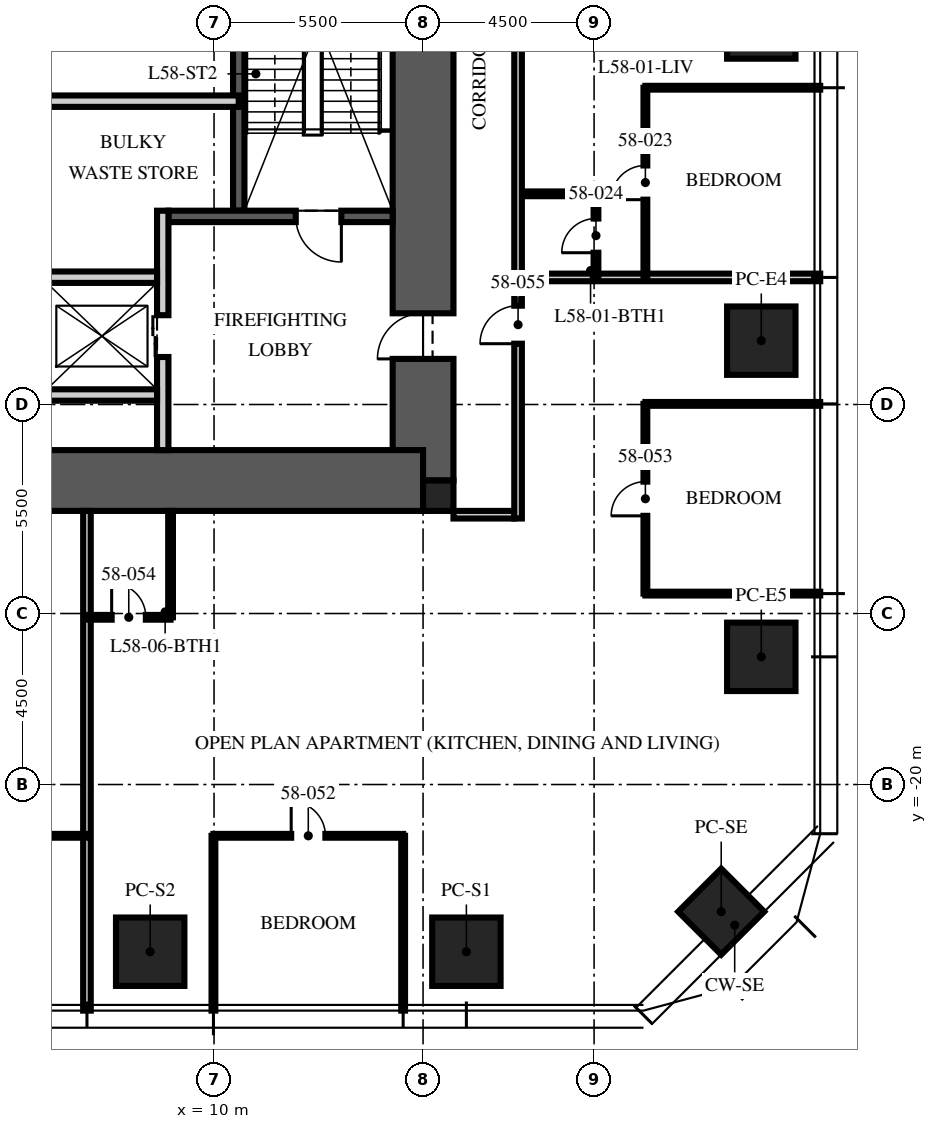
"""IFC4 building model, lengths in metres.
Left out: names, types, materials, properties, quantities, classifications, styles, units other than length and angle.
Written with IfcOpenShell. Run it as: python <this file> out.ifc"""

import sys

from ifc_helpers import new_model, si_unit, direction, frame, frame_2d, origin, origin_2d, place, context, subcontext, project, spatial, rectangle, extrude, element, fill, save


model = new_model("IFC4")
c1 = context("Model", 3, precision=1e-05, world=origin(), true_north=direction((0.0, 1.0)))
c2 = subcontext(c1, "Body", "Model", "MODEL_VIEW")
j1 = project(units=[si_unit("LENGTHUNIT", "METRE"), si_unit("PLANEANGLEUNIT", "RADIAN")], contexts=[c1])
p1 = place(None, origin())
s1 = spatial("IfcSite", under=j1, at=p1, CompositionType="ELEMENT")
p2 = place(p1, origin())
s2 = spatial("IfcBuilding", under=s1, at=p2, CompositionType="ELEMENT")
p3 = place(p2, frame((0.0, 0.0, 233.25)))
s3 = spatial("IfcBuildingStorey", under=s2, at=p3, CompositionType="ELEMENT", Elevation=233.25)
p4 = place(p3, frame((15.5, -12.0, -0.25), z_axis=(0.0, 0.0, 1.0), x_axis=(0.0, 1.0, 0.0)))
e1 = element("IfcWall", 1, at=p4, inside=s3, PredefinedType="SHEAR", context=c2, shape_type="SweptSolid", body=[
    extrude(rectangle(XDim=24.0, YDim=1.6, at=frame_2d((12.0, 0.0))), origin(), (0.0, 0.0, 1.0), 3.75),
])
p5 = place(p4, frame((3.2, 0.0, 0.25)))
e2 = element("IfcOpeningElement", 2, at=p5, cuts=e1, PredefinedType="OPENING", context=c2, shape_type="SweptSolid", body=[
    extrude(rectangle(XDim=1.2, YDim=2.1, at=frame_2d((0.6, 1.05))), frame((0.0, 0.81, 0.0), z_axis=(0.0, -1.0, 0.0), x_axis=(1.0, 0.0, 0.0)), (0.0, 0.0, 1.0), 1.62),
])
p6 = place(p4, frame((19.3, 0.0, 0.25)))
e3 = element("IfcOpeningElement", 3, at=p6, cuts=e1, PredefinedType="OPENING", context=c2, shape_type="SweptSolid", body=[
    extrude(rectangle(XDim=1.8, YDim=2.1, at=frame_2d((0.9, 1.05))), frame((0.0, 0.81, 0.0), z_axis=(0.0, -1.0, 0.0), x_axis=(1.0, 0.0, 0.0)), (0.0, 0.0, 1.0), 1.62),
])
p7 = place(p3, frame((-15.5, -12.0, -0.25), z_axis=(0.0, 0.0, 1.0), x_axis=(1.0, 0.0, 0.0)))
e4 = element("IfcWall", 4, at=p7, inside=s3, PredefinedType="SHEAR", context=c2, shape_type="SweptSolid", body=[
    extrude(rectangle(XDim=31.0, YDim=1.6, at=frame_2d((15.5, 0.0))), origin(), (0.0, 0.0, 1.0), 3.75),
])
p8 = place(p3, frame((15.9, -12.4, -0.25), z_axis=(0.0, 0.0, 1.0), x_axis=(1.0, 0.0, 0.0)))
e5 = element("IfcColumn", 5, at=p8, inside=s3, PredefinedType="COLUMN", context=c2, shape_type="SweptSolid", body=[
    extrude(rectangle(XDim=0.8, YDim=0.8, at=origin_2d()), origin(), (0.0, 0.0, 1.0), 3.75),
])
for number, where, z_axis, x_axis in (
    (6, (24.4, 0.0, 0.0), (0.0, 0.0, 1.0), (0.0, 1.0, 0.0)),
    (7, (24.4, -8.32, 0.0), (0.0, 0.0, 1.0), (0.0, 1.0, 0.0)),
    (8, (24.4, -16.64, 0.0), (0.0, 0.0, 1.0), (0.0, 1.0, 0.0)),
    (9, (16.64, -24.4, 0.0), (0.0, 0.0, 1.0), (1.0, 0.0, 0.0)),
    (10, (8.32, -24.4, 0.0), (0.0, 0.0, 1.0), (1.0, 0.0, 0.0)),
):
    element("IfcColumn", number, at=place(p3, frame(where, z_axis=z_axis, x_axis=x_axis)), inside=s3, PredefinedType="COLUMN", context=c2, shape_type="SweptSolid", body=[
        extrude(rectangle(XDim=1.8, YDim=1.8, at=origin_2d()), origin(), (0.0, 0.0, 1.0), 3.75),
    ])
p9 = place(p3, frame((23.346, -23.346, 0.0), z_axis=(0.0, 0.0, 1.0), x_axis=(0.707106781187, 0.707106781187, 0.0)))
e11 = element("IfcColumn", 11, at=p9, inside=s3, PredefinedType="COLUMN", context=c2, shape_type="SweptSolid", body=[
    extrude(rectangle(XDim=1.6, YDim=1.6, at=origin_2d()), origin(), (0.0, 0.0, 1.0), 3.75),
])
p10 = place(p3, frame((10.65, -4.9, 0.0), z_axis=(0.0, 0.0, 1.0), x_axis=(0.0, 1.0, 0.0)))
e12 = element("IfcWall", 12, at=p10, inside=s3, PredefinedType="SOLIDWALL", context=c2, shape_type="SweptSolid", body=[
    extrude(rectangle(XDim=10.1, YDim=0.3, at=frame_2d((5.05, 0.0))), origin(), (0.0, 0.0, 1.0), 3.5),
])
p11 = place(p3, frame((14.7, -5.05, 0.0), z_axis=(0.0, 0.0, 1.0), x_axis=(-1.0, 0.0, 0.0)))
e13 = element("IfcWall", 13, at=p11, inside=s3, PredefinedType="SOLIDWALL", context=c2, shape_type="SweptSolid", body=[
    extrude(rectangle(XDim=5.9, YDim=0.3, at=frame_2d((2.95, 0.0))), origin(), (0.0, 0.0, 1.0), 3.5),
])
p12 = place(p11, frame((1.35, 0.0, 0.0)))
e14 = element("IfcOpeningElement", 14, at=p12, cuts=e13, PredefinedType="OPENING", context=c2, shape_type="SweptSolid", body=[
    extrude(rectangle(XDim=1.2, YDim=2.1, at=frame_2d((0.6, 1.05))), frame((0.0, 0.16, 0.0), z_axis=(0.0, -1.0, 0.0), x_axis=(1.0, 0.0, 0.0)), (0.0, 0.0, 1.0), 0.32),
])
p13 = place(p3, frame((8.65, -11.2, 0.0), z_axis=(0.0, 0.0, 1.0), x_axis=(0.0, 1.0, 0.0)))
e15 = element("IfcWall", 15, at=p13, inside=s3, PredefinedType="PARTITIONING", context=c2, shape_type="SweptSolid", body=[
    extrude(rectangle(XDim=6.3, YDim=0.3, at=frame_2d((3.15, 0.0))), origin(), (0.0, 0.0, 1.0), 3.5),
])
p14 = place(p13, frame((2.45, 0.0, 0.0)))
e16 = element("IfcOpeningElement", 16, at=p14, cuts=e15, PredefinedType="OPENING", context=c2, shape_type="SweptSolid", body=[
    extrude(rectangle(XDim=1.1, YDim=2.1, at=frame_2d((0.55, 1.05))), frame((0.0, 0.16, 0.0), z_axis=(0.0, -1.0, 0.0), x_axis=(1.0, 0.0, 0.0)), (0.0, 0.0, 1.0), 0.32),
])
p15 = place(p3, frame((-8.5, -6.65, 0.0), z_axis=(0.0, 0.0, 1.0), x_axis=(1.0, 0.0, 0.0)))
e17 = element("IfcWall", 17, at=p15, inside=s3, PredefinedType="PARTITIONING", context=c2, shape_type="SweptSolid", body=[
    extrude(rectangle(XDim=17.0, YDim=0.3, at=frame_2d((8.5, 0.0))), origin(), (0.0, 0.0, 1.0), 3.5),
])
p16 = place(p15, frame((7.8, 0.0, 0.0)))
e18 = element("IfcOpeningElement", 18, at=p16, cuts=e17, PredefinedType="OPENING", context=c2, shape_type="SweptSolid", body=[
    extrude(rectangle(XDim=1.3, YDim=2.4, at=frame_2d((0.65, 1.2))), frame((0.0, 0.16, 0.0), z_axis=(0.0, -1.0, 0.0), x_axis=(1.0, 0.0, 0.0)), (0.0, 0.0, 1.0), 0.32),
])
p17 = place(p15, frame((5.65, 0.0, 0.0)))
e19 = element("IfcOpeningElement", 19, at=p17, cuts=e17, PredefinedType="OPENING", context=c2, shape_type="SweptSolid", body=[
    extrude(rectangle(XDim=0.9, YDim=2.1, at=frame_2d((0.45, 1.05))), frame((0.0, 0.16, 0.0), z_axis=(0.0, -1.0, 0.0), x_axis=(1.0, 0.0, 0.0)), (0.0, 0.0, 1.0), 0.32),
])
p18 = place(p15, frame((10.4, 0.0, 0.0)))
e20 = element("IfcOpeningElement", 20, at=p18, cuts=e17, PredefinedType="OPENING", context=c2, shape_type="SweptSolid", body=[
    extrude(rectangle(XDim=0.9, YDim=2.1, at=frame_2d((0.45, 1.05))), frame((0.0, 0.16, 0.0), z_axis=(0.0, -1.0, 0.0), x_axis=(1.0, 0.0, 0.0)), (0.0, 0.0, 1.0), 0.32),
])
p19 = place(p3, frame((5.6, -9.75, 0.0), z_axis=(0.0, 0.0, 1.0), x_axis=(1.0, 0.0, 0.0)))
e21 = element("IfcWall", 21, at=p19, inside=s3, PredefinedType="PARTITIONING", context=c2, shape_type="SweptSolid", body=[
    extrude(rectangle(XDim=2.9, YDim=0.3, at=frame_2d((1.45, 0.0))), origin(), (0.0, 0.0, 1.0), 3.5),
])
p20 = place(p3, frame((10.65, -2.018, 0.0), z_axis=(0.0, 0.0, 1.0), x_axis=(-1.0, 0.0, 0.0)))
e22 = element("IfcWall", 22, at=p20, inside=s3, PredefinedType="PARTITIONING", context=c2, shape_type="SweptSolid", body=[
    extrude(rectangle(XDim=5.55, YDim=0.3, at=frame_2d((2.775, 0.0))), origin(), (0.0, 0.0, 1.0), 3.5),
])
p21 = place(p3, frame((16.3, -12.9, 0.0), z_axis=(0.0, 0.0, 1.0), x_axis=(1.0, 0.0, 0.0)))
e23 = element("IfcWall", 23, at=p21, inside=s3, PredefinedType="PARTITIONING", context=c2, shape_type="SweptSolid", body=[
    extrude(rectangle(XDim=1.6, YDim=0.2, at=frame_2d((0.8, 0.0))), origin(), (0.0, 0.0, 1.0), 2.3),
])
p22 = place(p3, frame((18.1, -6.656, 0.0), z_axis=(0.0, 0.0, 1.0), x_axis=(1.0, 0.0, 0.0)))
e24 = element("IfcWall", 24, at=p22, inside=s3, PredefinedType="PARTITIONING", context=c2, shape_type="SweptSolid", body=[
    extrude(rectangle(XDim=7.85, YDim=0.2, at=frame_2d((3.925, 0.0))), origin(), (0.0, 0.0, 1.0), 2.91),
])
p23 = place(p3, frame((21.35, -1.664, 0.0), z_axis=(0.0, 0.0, 1.0), x_axis=(1.0, 0.0, 0.0)))
e25 = element("IfcWall", 25, at=p23, inside=s3, PredefinedType="PARTITIONING", context=c2, shape_type="SweptSolid", body=[
    extrude(rectangle(XDim=4.6, YDim=0.1, at=frame_2d((2.3, 0.0))), origin(), (0.0, 0.0, 1.0), 2.91),
])
p24 = place(p3, frame((6.656, -12.8, 0.0), z_axis=(0.0, 0.0, 1.0), x_axis=(0.0, -1.0, 0.0)))
e26 = element("IfcWall", 26, at=p24, inside=s3, PredefinedType="PARTITIONING", context=c2, shape_type="SweptSolid", body=[
    extrude(rectangle(XDim=13.15, YDim=0.2, at=frame_2d((6.575, 0.0))), origin(), (0.0, 0.0, 1.0), 2.91),
])
for number, where, z_axis, x_axis in (
    (27, (9.984, -21.35, 0.0), (0.0, 0.0, 1.0), (0.0, -1.0, 0.0)),
    (28, (14.976, -21.35, 0.0), (0.0, 0.0, 1.0), (0.0, -1.0, 0.0)),
    (29, (21.35, -14.976, 0.0), (0.0, 0.0, 1.0), (1.0, 0.0, 0.0)),
    (30, (21.35, -9.984, 0.0), (0.0, 0.0, 1.0), (1.0, 0.0, 0.0)),
):
    element("IfcWall", number, at=place(p3, frame(where, z_axis=z_axis, x_axis=x_axis)), inside=s3, PredefinedType="PARTITIONING", context=c2, shape_type="SweptSolid", body=[
        extrude(rectangle(XDim=4.6, YDim=0.1, at=frame_2d((2.3, 0.0))), origin(), (0.0, 0.0, 1.0), 2.91),
    ])
p25 = place(p3, frame((21.35, -6.656, 0.0), z_axis=(0.0, 0.0, 1.0), x_axis=(0.0, 1.0, 0.0)))
e31 = element("IfcWall", 31, at=p25, inside=s3, PredefinedType="PARTITIONING", context=c2, shape_type="SweptSolid", body=[
    extrude(rectangle(XDim=4.992, YDim=0.1, at=frame_2d((2.496, 0.0))), origin(), (0.0, 0.0, 1.0), 2.81),
])
p26 = place(p25, frame((2.046, 0.0, 0.0)))
e32 = element("IfcOpeningElement", 32, at=p26, cuts=e31, PredefinedType="OPENING", context=c2, shape_type="SweptSolid", body=[
    extrude(rectangle(XDim=0.9, YDim=2.1, at=frame_2d((0.45, 1.05))), frame((0.0, 0.06, 0.0), z_axis=(0.0, -1.0, 0.0), x_axis=(1.0, 0.0, 0.0)), (0.0, 0.0, 1.0), 0.12),
])
p27 = place(p3, frame((20.05, -6.656, 0.0), z_axis=(0.0, 0.0, 1.0), x_axis=(0.0, 1.0, 0.0)))
e33 = element("IfcWall", 33, at=p27, inside=s3, PredefinedType="PARTITIONING", context=c2, shape_type="SweptSolid", body=[
    extrude(rectangle(XDim=2.2, YDim=0.125, at=frame_2d((1.1, 0.0))), origin(), (0.0, 0.0, 1.0), 3.5),
])
p28 = place(p27, frame((0.65, 0.0, 0.0)))
e34 = element("IfcOpeningElement", 34, at=p28, cuts=e33, PredefinedType="OPENING", context=c2, shape_type="SweptSolid", body=[
    extrude(rectangle(XDim=0.9, YDim=2.1, at=frame_2d((0.45, 1.05))), frame((0.0, 0.073, 0.0), z_axis=(0.0, -1.0, 0.0), x_axis=(1.0, 0.0, 0.0)), (0.0, 0.0, 1.0), 0.145),
])
p29 = place(p3, frame((18.1, -4.456, 0.0), z_axis=(0.0, 0.0, 1.0), x_axis=(1.0, 0.0, 0.0)))
e35 = element("IfcWall", 35, at=p29, inside=s3, PredefinedType="PARTITIONING", context=c2, shape_type="SweptSolid", body=[
    extrude(rectangle(XDim=1.95, YDim=0.125, at=frame_2d((0.975, 0.0))), origin(), (0.0, 0.0, 1.0), 3.5),
])
p30 = place(p3, frame((1.664, -21.35, 0.0), z_axis=(0.0, 0.0, 1.0), x_axis=(1.0, 0.0, 0.0)))
e36 = element("IfcWall", 36, at=p30, inside=s3, PredefinedType="PARTITIONING", context=c2, shape_type="SweptSolid", body=[
    extrude(rectangle(XDim=4.992, YDim=0.1, at=frame_2d((2.496, 0.0))), origin(), (0.0, 0.0, 1.0), 2.81),
])
p31 = place(p30, frame((2.046, 0.0, 0.0)))
e37 = element("IfcOpeningElement", 37, at=p31, cuts=e36, PredefinedType="OPENING", context=c2, shape_type="SweptSolid", body=[
    extrude(rectangle(XDim=0.9, YDim=2.1, at=frame_2d((0.45, 1.05))), frame((0.0, 0.06, 0.0), z_axis=(0.0, -1.0, 0.0), x_axis=(1.0, 0.0, 0.0)), (0.0, 0.0, 1.0), 0.12),
])
p32 = place(p3, frame((9.984, -21.35, 0.0), z_axis=(0.0, 0.0, 1.0), x_axis=(1.0, 0.0, 0.0)))
e38 = element("IfcWall", 38, at=p32, inside=s3, PredefinedType="PARTITIONING", context=c2, shape_type="SweptSolid", body=[
    extrude(rectangle(XDim=4.992, YDim=0.1, at=frame_2d((2.496, 0.0))), origin(), (0.0, 0.0, 1.0), 2.81),
])
p33 = place(p32, frame((2.046, 0.0, 0.0)))
e39 = element("IfcOpeningElement", 39, at=p33, cuts=e38, PredefinedType="OPENING", context=c2, shape_type="SweptSolid", body=[
    extrude(rectangle(XDim=0.9, YDim=2.1, at=frame_2d((0.45, 1.05))), frame((0.0, 0.06, 0.0), z_axis=(0.0, -1.0, 0.0), x_axis=(1.0, 0.0, 0.0)), (0.0, 0.0, 1.0), 0.12),
])
p34 = place(p3, frame((21.35, -14.976, 0.0), z_axis=(0.0, 0.0, 1.0), x_axis=(0.0, 1.0, 0.0)))
e40 = element("IfcWall", 40, at=p34, inside=s3, PredefinedType="PARTITIONING", context=c2, shape_type="SweptSolid", body=[
    extrude(rectangle(XDim=4.992, YDim=0.1, at=frame_2d((2.496, 0.0))), origin(), (0.0, 0.0, 1.0), 2.81),
])
p35 = place(p34, frame((2.046, 0.0, 0.0)))
e41 = element("IfcOpeningElement", 41, at=p35, cuts=e40, PredefinedType="OPENING", context=c2, shape_type="SweptSolid", body=[
    extrude(rectangle(XDim=0.9, YDim=2.1, at=frame_2d((0.45, 1.05))), frame((0.0, 0.06, 0.0), z_axis=(0.0, -1.0, 0.0), x_axis=(1.0, 0.0, 0.0)), (0.0, 0.0, 1.0), 0.12),
])
p36 = place(p3, frame((6.656, -15.6, 0.0), z_axis=(0.0, 0.0, 1.0), x_axis=(1.0, 0.0, 0.0)))
e42 = element("IfcWall", 42, at=p36, inside=s3, PredefinedType="PARTITIONING", context=c2, shape_type="SweptSolid", body=[
    extrude(rectangle(XDim=2.2, YDim=0.125, at=frame_2d((1.1, 0.0))), origin(), (0.0, 0.0, 1.0), 2.6),
])
p37 = place(p36, frame((0.65, 0.0, 0.0)))
e43 = element("IfcOpeningElement", 43, at=p37, cuts=e42, PredefinedType="OPENING", context=c2, shape_type="SweptSolid", body=[
    extrude(rectangle(XDim=0.9, YDim=2.1, at=frame_2d((0.45, 1.05))), frame((0.0, 0.073, 0.0), z_axis=(0.0, -1.0, 0.0), x_axis=(1.0, 0.0, 0.0)), (0.0, 0.0, 1.0), 0.145),
])
p38 = place(p3, frame((8.856, -12.8, 0.0), z_axis=(0.0, 0.0, 1.0), x_axis=(0.0, -1.0, 0.0)))
e44 = element("IfcWall", 44, at=p38, inside=s3, PredefinedType="PARTITIONING", context=c2, shape_type="SweptSolid", body=[
    extrude(rectangle(XDim=2.8, YDim=0.125, at=frame_2d((1.4, 0.0))), origin(), (0.0, 0.0, 1.0), 3.5),
])
p39 = place(p3, frame((18.0, -13.0, 0.0), z_axis=(0.0, 0.0, 1.0), x_axis=(0.0, 1.0, 0.0)))
e45 = element("IfcWall", 45, at=p39, inside=s3, PredefinedType="PARTITIONING", context=c2, shape_type="SweptSolid", body=[
    extrude(rectangle(XDim=26.0, YDim=0.2, at=frame_2d((13.0, 0.0))), origin(), (0.0, 0.0, 1.0), 2.6),
])
p40 = place(p39, frame((13.114, 0.0, 0.0)))
e46 = element("IfcOpeningElement", 46, at=p40, cuts=e45, PredefinedType="OPENING", context=c2, shape_type="SweptSolid", body=[
    extrude(rectangle(XDim=1.0, YDim=2.2, at=frame_2d((0.5, 1.1))), frame((0.0, 0.11, 0.0), z_axis=(0.0, -1.0, 0.0), x_axis=(1.0, 0.0, 0.0)), (0.0, 0.0, 1.0), 0.22),
])
p41 = place(p39, frame((23.684, 0.0, 0.0)))
e47 = element("IfcOpeningElement", 47, at=p41, cuts=e45, PredefinedType="OPENING", context=c2, shape_type="SweptSolid", body=[
    extrude(rectangle(XDim=1.0, YDim=2.2, at=frame_2d((0.5, 1.1))), frame((0.0, 0.11, 0.0), z_axis=(0.0, -1.0, 0.0), x_axis=(1.0, 0.0, 0.0)), (0.0, 0.0, 1.0), 0.22),
])
p42 = place(p39, frame((4.6, 0.0, 0.0)))
e48 = element("IfcOpeningElement", 48, at=p42, cuts=e45, PredefinedType="OPENING", context=c2, shape_type="SweptSolid", body=[
    extrude(rectangle(XDim=1.0, YDim=2.2, at=frame_2d((0.5, 1.1))), frame((0.0, 0.11, 0.0), z_axis=(0.0, -1.0, 0.0), x_axis=(1.0, 0.0, 0.0)), (0.0, 0.0, 1.0), 0.22),
])
p43 = place(p12, origin())
e49 = element("IfcDoor", 49, at=p43, inside=s3, OperationType="SINGLE_SWING_LEFT", PredefinedType="DOOR", context=c2, shape_type="SweptSolid", body=[
    extrude(rectangle(XDim=1.2, YDim=2.1, at=frame_2d((0.6, 1.05))), frame((0.0, 0.025, 0.0), z_axis=(0.0, -1.0, 0.0), x_axis=(1.0, 0.0, 0.0)), (0.0, 0.0, 1.0), 0.05),
])
fill(e14, e49)
p44 = place(p5, origin())
e50 = element("IfcDoor", 50, at=p44, inside=s3, OperationType="SINGLE_SWING_LEFT", PredefinedType="DOOR", context=c2, shape_type="SweptSolid", body=[
    extrude(rectangle(XDim=1.2, YDim=2.1, at=frame_2d((0.6, 1.05))), frame((0.0, 0.025, 0.0), z_axis=(0.0, -1.0, 0.0), x_axis=(1.0, 0.0, 0.0)), (0.0, 0.0, 1.0), 0.05),
])
fill(e2, e50)
p45 = place(p14, origin())
e51 = element("IfcDoor", 51, at=p45, inside=s3, OperationType="DOUBLE_DOOR_SLIDING", PredefinedType="DOOR", context=c2, shape_type="SweptSolid", body=[
    extrude(rectangle(XDim=1.1, YDim=2.1, at=frame_2d((0.55, 1.05))), frame((0.0, 0.025, 0.0), z_axis=(0.0, -1.0, 0.0), x_axis=(1.0, 0.0, 0.0)), (0.0, 0.0, 1.0), 0.05),
])
fill(e16, e51)
p46 = place(p26, origin())
e52 = element("IfcDoor", 52, at=p46, inside=s3, OperationType="SINGLE_SWING_LEFT", PredefinedType="DOOR", context=c2, shape_type="SweptSolid", body=[
    extrude(rectangle(XDim=0.9, YDim=2.1, at=frame_2d((0.45, 1.05))), frame((0.0, 0.025, 0.0), z_axis=(0.0, -1.0, 0.0), x_axis=(1.0, 0.0, 0.0)), (0.0, 0.0, 1.0), 0.05),
])
fill(e32, e52)
p47 = place(p28, origin())
e53 = element("IfcDoor", 53, at=p47, inside=s3, OperationType="SINGLE_SWING_LEFT", PredefinedType="DOOR", context=c2, shape_type="SweptSolid", body=[
    extrude(rectangle(XDim=0.9, YDim=2.1, at=frame_2d((0.45, 1.05))), frame((0.0, 0.025, 0.0), z_axis=(0.0, -1.0, 0.0), x_axis=(1.0, 0.0, 0.0)), (0.0, 0.0, 1.0), 0.05),
])
fill(e34, e53)
p48 = place(p33, origin())
e54 = element("IfcDoor", 54, at=p48, inside=s3, OperationType="SINGLE_SWING_LEFT", PredefinedType="DOOR", context=c2, shape_type="SweptSolid", body=[
    extrude(rectangle(XDim=0.9, YDim=2.1, at=frame_2d((0.45, 1.05))), frame((0.0, 0.025, 0.0), z_axis=(0.0, -1.0, 0.0), x_axis=(1.0, 0.0, 0.0)), (0.0, 0.0, 1.0), 0.05),
])
fill(e39, e54)
p49 = place(p35, origin())
e55 = element("IfcDoor", 55, at=p49, inside=s3, OperationType="SINGLE_SWING_LEFT", PredefinedType="DOOR", context=c2, shape_type="SweptSolid", body=[
    extrude(rectangle(XDim=0.9, YDim=2.1, at=frame_2d((0.45, 1.05))), frame((0.0, 0.025, 0.0), z_axis=(0.0, -1.0, 0.0), x_axis=(1.0, 0.0, 0.0)), (0.0, 0.0, 1.0), 0.05),
])
fill(e41, e55)
p50 = place(p37, origin())
e56 = element("IfcDoor", 56, at=p50, inside=s3, OperationType="SINGLE_SWING_LEFT", PredefinedType="DOOR", context=c2, shape_type="SweptSolid", body=[
    extrude(rectangle(XDim=0.9, YDim=2.1, at=frame_2d((0.45, 1.05))), frame((0.0, 0.025, 0.0), z_axis=(0.0, -1.0, 0.0), x_axis=(1.0, 0.0, 0.0)), (0.0, 0.0, 1.0), 0.05),
])
fill(e43, e56)
p51 = place(p42, origin())
e57 = element("IfcDoor", 57, at=p51, inside=s3, OperationType="SINGLE_SWING_LEFT", PredefinedType="DOOR", context=c2, shape_type="SweptSolid", body=[
    extrude(rectangle(XDim=1.0, YDim=2.2, at=frame_2d((0.5, 1.1))), frame((0.0, 0.025, 0.0), z_axis=(0.0, -1.0, 0.0), x_axis=(1.0, 0.0, 0.0)), (0.0, 0.0, 1.0), 0.05),
])
fill(e48, e57)
save(model, sys.argv[1])
